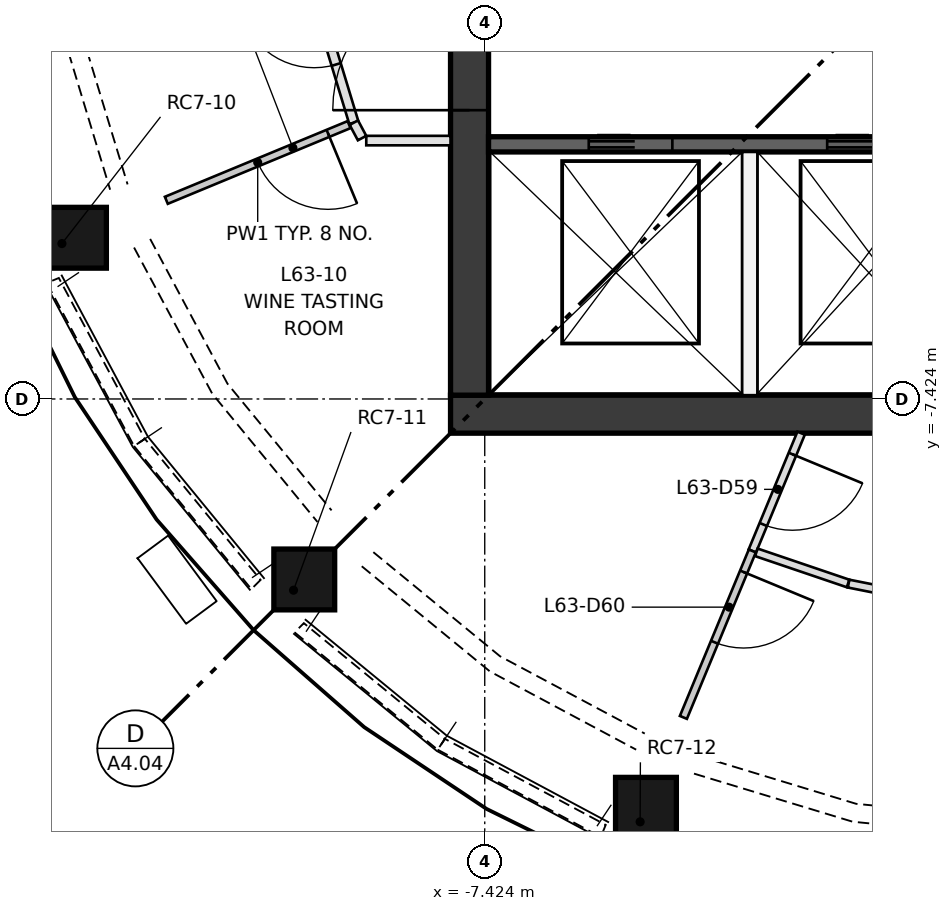
"""IFC4 building model, lengths in metres.
Left out: names, types, materials, properties, quantities, classifications, styles, units other than length and angle.
Written with IfcOpenShell. Run it as: python <this file> out.ifc"""

import sys

from ifc_helpers import new_model, si_unit, direction, frame, frame_2d, origin, origin_2d, place, context, subcontext, project, spatial, polyline, rectangle, outline, extrude, element, fill, save


model = new_model("IFC4")
c1 = context("Model", 3, precision=1e-05, world=origin(), true_north=direction((0.0, 1.0)))
c2 = subcontext(c1, "Body", "Model", "MODEL_VIEW")
j1 = project(units=[si_unit("LENGTHUNIT", "METRE"), si_unit("PLANEANGLEUNIT", "RADIAN")], contexts=[c1])
p1 = place(None, origin())
s1 = spatial("IfcSite", under=j1, at=p1, CompositionType="ELEMENT")
p2 = place(p1, origin())
s2 = spatial("IfcBuilding", under=s1, at=p2, CompositionType="ELEMENT")
p3 = place(p2, frame((0.0, 0.0, 231.2)))
s3 = spatial("IfcBuildingStorey", under=s2, at=p3, CompositionType="ELEMENT", Elevation=231.2)
p4 = place(p3, frame((-12.987, -5.379, 0.5), z_axis=(0.0, 0.0, 1.0), x_axis=(-0.382642651649, 0.923896423382, 0.0)))
e1 = element("IfcColumn", 1, at=p4, inside=s3, PredefinedType="COLUMN", context=c2, shape_type="SweptSolid", body=[
    extrude(rectangle(XDim=0.8, YDim=0.8, at=origin_2d()), origin(), (0.0, -0.275, 0.962), 3.328),
])
p5 = place(p3, frame((-9.94, -9.94, 0.5), z_axis=(0.0, 0.0, 1.0), x_axis=(-0.707106781187, 0.707106781187, 0.0)))
e2 = element("IfcColumn", 2, at=p5, inside=s3, PredefinedType="COLUMN", context=c2, shape_type="SweptSolid", body=[
    extrude(rectangle(XDim=0.8, YDim=0.8, at=origin_2d()), origin(), (0.0, -0.275, 0.962), 3.328),
])
p6 = place(p3, frame((-5.379, -12.987, 0.5), z_axis=(0.0, 0.0, 1.0), x_axis=(-0.923896423382, 0.382642651649, 0.0)))
e3 = element("IfcColumn", 3, at=p6, inside=s3, PredefinedType="COLUMN", context=c2, shape_type="SweptSolid", body=[
    extrude(rectangle(XDim=0.8, YDim=0.8, at=origin_2d()), origin(), (0.0, -0.275, 0.962), 3.328),
])
p7 = place(p3, frame((-7.874, -7.624, 0.0), z_axis=(0.0, 0.0, 1.0), x_axis=(1.0, 0.0, 0.0)))
e4 = element("IfcWall", 4, at=p7, inside=s3, PredefinedType="SHEAR", context=c2, shape_type="SweptSolid", body=[
    extrude(rectangle(XDim=15.748, YDim=0.5, at=frame_2d((7.874, 0.0))), origin(), (0.0, 0.0, 1.0), 3.3),
])
p8 = place(p3, frame((-7.624, -7.374, 0.0), z_axis=(0.0, 0.0, 1.0), x_axis=(0.0, 1.0, 0.0)))
e5 = element("IfcWall", 5, at=p8, inside=s3, PredefinedType="SHEAR", context=c2, shape_type="SweptSolid", body=[
    extrude(rectangle(XDim=14.748, YDim=0.5, at=frame_2d((7.374, 0.0))), origin(), (0.0, 0.0, 1.0), 3.3),
])
p9 = place(p8, frame((6.874, 0.0, 0.0)))
e6 = element("IfcOpeningElement", 6, at=p9, cuts=e5, PredefinedType="OPENING", context=c2, shape_type="SweptSolid", body=[
    extrude(rectangle(XDim=1.0, YDim=2.1, at=frame_2d((0.5, 1.05))), frame((0.0, 0.26, 0.0), z_axis=(0.0, -1.0, 0.0), x_axis=(1.0, 0.0, 0.0)), (0.0, 0.0, 1.0), 0.52),
])
p10 = place(p8, frame((3.75, 0.0, 0.0)))
e7 = element("IfcOpeningElement", 7, at=p10, cuts=e5, PredefinedType="OPENING", context=c2, shape_type="SweptSolid", body=[
    extrude(rectangle(XDim=1.8, YDim=2.1, at=frame_2d((0.9, 1.05))), frame((0.0, 0.26, 0.0), z_axis=(0.0, -1.0, 0.0), x_axis=(1.0, 0.0, 0.0)), (0.0, 0.0, 1.0), 0.52),
])
p11 = place(p8, frame((9.198, 0.0, 0.0)))
e8 = element("IfcOpeningElement", 8, at=p11, cuts=e5, PredefinedType="OPENING", context=c2, shape_type="SweptSolid", body=[
    extrude(rectangle(XDim=1.8, YDim=2.1, at=frame_2d((0.9, 1.05))), frame((0.0, 0.26, 0.0), z_axis=(0.0, -1.0, 0.0), x_axis=(1.0, 0.0, 0.0)), (0.0, 0.0, 1.0), 0.52),
])
p12 = place(p3, frame((-7.374, -4.074, 0.0), z_axis=(0.0, 0.0, 1.0), x_axis=(1.0, 0.0, 0.0)))
e9 = element("IfcWall", 9, at=p12, inside=s3, PredefinedType="SHEAR", context=c2, shape_type="SweptSolid", body=[
    extrude(rectangle(XDim=14.748, YDim=0.2, at=frame_2d((7.374, 0.0))), origin(), (0.0, 0.0, 1.0), 3.3),
])
p13 = place(p12, frame((1.319, 0.0, 0.0)))
e10 = element("IfcOpeningElement", 10, at=p13, cuts=e9, PredefinedType="OPENING", context=c2, shape_type="SweptSolid", body=[
    extrude(rectangle(XDim=1.1, YDim=2.1, at=frame_2d((0.55, 1.05))), frame((0.0, 0.11, 0.0), z_axis=(0.0, -1.0, 0.0), x_axis=(1.0, 0.0, 0.0)), (0.0, 0.0, 1.0), 0.22),
])
p14 = place(p12, frame((4.456, 0.0, 0.0)))
e11 = element("IfcOpeningElement", 11, at=p14, cuts=e9, PredefinedType="OPENING", context=c2, shape_type="SweptSolid", body=[
    extrude(rectangle(XDim=1.1, YDim=2.1, at=frame_2d((0.55, 1.05))), frame((0.0, 0.11, 0.0), z_axis=(0.0, -1.0, 0.0), x_axis=(1.0, 0.0, 0.0)), (0.0, 0.0, 1.0), 0.22),
])
p15 = place(p12, frame((7.689, 0.0, 0.0)))
e12 = element("IfcOpeningElement", 12, at=p15, cuts=e9, PredefinedType="OPENING", context=c2, shape_type="SweptSolid", body=[
    extrude(rectangle(XDim=1.0, YDim=2.1, at=frame_2d((0.5, 1.05))), frame((0.0, 0.11, 0.0), z_axis=(0.0, -1.0, 0.0), x_axis=(1.0, 0.0, 0.0)), (0.0, 0.0, 1.0), 0.22),
])
p16 = place(p12, frame((10.413, 0.0, 0.0)))
e13 = element("IfcOpeningElement", 13, at=p16, cuts=e9, PredefinedType="OPENING", context=c2, shape_type="SweptSolid", body=[
    extrude(rectangle(XDim=1.0, YDim=2.1, at=frame_2d((0.5, 1.05))), frame((0.0, 0.11, 0.0), z_axis=(0.0, -1.0, 0.0), x_axis=(1.0, 0.0, 0.0)), (0.0, 0.0, 1.0), 0.22),
])
p17 = place(p12, frame((12.935, 0.0, 0.0)))
e14 = element("IfcOpeningElement", 14, at=p17, cuts=e9, PredefinedType="OPENING", context=c2, shape_type="SweptSolid", body=[
    extrude(rectangle(XDim=1.0, YDim=2.1, at=frame_2d((0.5, 1.05))), frame((0.0, 0.11, 0.0), z_axis=(0.0, -1.0, 0.0), x_axis=(1.0, 0.0, 0.0)), (0.0, 0.0, 1.0), 0.22),
])
p18 = place(p3, frame((-3.937, -7.374, 0.0), z_axis=(0.0, 0.0, 1.0), x_axis=(0.0, 1.0, 0.0)))
e15 = element("IfcWall", 15, at=p18, inside=s3, PredefinedType="PARTITIONING", context=c2, shape_type="SweptSolid", body=[
    extrude(rectangle(XDim=3.2, YDim=0.2, at=frame_2d((1.6, 0.0))), origin(), (0.0, 0.0, 1.0), 3.3),
])
p19 = place(p3, frame((-14.2, -2.824, 0.0), z_axis=(-0.894721380135, -0.271074750296, 0.354953703573), x_axis=(0.289959608839, -0.957038883806, 1.1226683e-05)))
e16 = element("IfcWall", 16, at=p19, inside=s3, PredefinedType="SOLIDWALL", context=c2, shape_type="SweptSolid", body=[
    extrude(outline(polyline([(0.0, 0.0), (2.434, -5.551e-17), (2.417, 0.481), (0.017, 0.481), (0.0, 0.0)])), origin(), (0.0, 0.0, -1.0), 0.3),
])
p20 = place(p3, frame((-13.186, -5.898, 0.0), z_axis=(-0.824332600798, -0.441016524886, 0.35493687895), x_axis=(0.471734377661, -0.881740708382, 1.0715603e-05)))
e17 = element("IfcWall", 17, at=p20, inside=s3, PredefinedType="SOLIDWALL", context=c2, shape_type="SweptSolid", body=[
    extrude(outline(polyline([(0.0, 0.0), (2.434, 0.0), (2.417, 0.481), (0.017, 0.481), (0.0, 0.0)])), origin(), (0.0, 0.0, -1.0), 0.3),
])
p21 = place(p3, frame((-12.038, -8.044, 0.0), z_axis=(-0.722862546463, -0.59284076781, 0.354978257002), x_axis=(0.634136527431, -0.773221096766, -9.701072e-06)))
e18 = element("IfcWall", 18, at=p21, inside=s3, PredefinedType="SOLIDWALL", context=c2, shape_type="SweptSolid", body=[
    extrude(outline(polyline([(0.0, 0.0), (2.434, 5.551e-17), (2.417, 0.481), (0.017, 0.481), (0.0, 0.0)])), origin(), (0.0, 0.0, -1.0), 0.3),
])
p22 = place(p3, frame((-9.926, -10.495, 0.0), z_axis=(-0.59284076781, -0.722862546463, 0.354978257002), x_axis=(0.773221096766, -0.634136527431, 9.701072e-06)))
e19 = element("IfcWall", 19, at=p22, inside=s3, PredefinedType="SOLIDWALL", context=c2, shape_type="SweptSolid", body=[
    extrude(outline(polyline([(0.0, 0.0), (2.434, -5.551e-17), (2.417, 0.481), (0.017, 0.481), (0.0, 0.0)])), origin(), (0.0, 0.0, -1.0), 0.3),
])
p23 = place(p3, frame((-8.044, -12.038, 0.0), z_axis=(-0.441126603603, -0.824402860411, 0.354636776631), x_axis=(0.881712517728, -0.471787066311, 1.195964e-05)))
e20 = element("IfcWall", 20, at=p23, inside=s3, PredefinedType="SOLIDWALL", context=c2, shape_type="SweptSolid", body=[
    extrude(outline(polyline([(0.0, 0.0), (2.434, 5.551e-17), (2.417, 0.481), (0.017, 0.481), (0.0, 0.0)])), origin(), (0.0, 0.0, -1.0), 0.3),
])
p24 = place(p3, frame((-5.154, -13.494, 0.0), z_axis=(-0.271094631402, -0.894631168658, 0.355165838574), x_axis=(0.957026634075, -0.290000037325, 4.815507e-06)))
e21 = element("IfcWall", 21, at=p24, inside=s3, PredefinedType="SOLIDWALL", context=c2, shape_type="SweptSolid", body=[
    extrude(outline(polyline([(0.0, 0.0), (2.434, 0.0), (2.417, 0.481), (0.017, 0.481), (0.0, 0.0)])), origin(), (0.0, 0.0, -1.0), 0.3),
])
p25 = place(p3, frame((-9.146, -3.789, 0.0), z_axis=(0.0, 0.0, 1.0), x_axis=(-0.29025256199, 0.956950077203, 0.0)))
e22 = element("IfcWall", 22, at=p25, inside=s3, PredefinedType="PARTITIONING", context=c2, shape_type="SweptSolid", body=[
    extrude(rectangle(XDim=1.935, YDim=0.125, at=frame_2d((0.967, 0.0))), origin(), (0.0, 0.0, 1.0), 3.3),
])
p26 = place(p25, frame((0.8, 0.0, 0.0)))
e23 = element("IfcOpeningElement", 23, at=p26, cuts=e22, PredefinedType="OPENING", context=c2, shape_type="SweptSolid", body=[
    extrude(rectangle(XDim=1.0, YDim=2.1, at=frame_2d((0.5, 1.05))), frame((0.0, 0.073, 0.0), z_axis=(0.0, -1.0, 0.0), x_axis=(1.0, 0.0, 0.0)), (0.0, 0.0, 1.0), 0.145),
])
p27 = place(p3, frame((-9.038, -3.991, 0.0), z_axis=(0.0, 0.0, 1.0), x_axis=(-0.471249165364, 0.882000127066, 0.0)))
e24 = element("IfcWall", 24, at=p27, inside=s3, PredefinedType="PARTITIONING", context=c2, shape_type="SweptSolid", body=[
    extrude(rectangle(XDim=0.23, YDim=0.125, at=frame_2d((0.115, 0.0))), origin(), (0.0, 0.0, 1.0), 3.3),
])
p28 = place(p3, frame((-7.874, -4.024, 0.0), z_axis=(0.0, 0.0, 1.0), x_axis=(-1.0, 0.0, 0.0)))
e25 = element("IfcWall", 25, at=p28, inside=s3, PredefinedType="PARTITIONING", context=c2, shape_type="SweptSolid", body=[
    extrude(rectangle(XDim=1.109, YDim=0.125, at=frame_2d((0.554, 0.0))), origin(), (0.0, 0.0, 1.0), 3.3),
])
p29 = place(p3, frame((-9.209, -3.814, 0.0), z_axis=(0.0, 0.0, 1.0), x_axis=(-0.923885342263, -0.382669406082, 0.0)))
e26 = element("IfcWall", 26, at=p29, inside=s3, PredefinedType="PARTITIONING", context=c2, shape_type="SweptSolid", body=[
    extrude(rectangle(XDim=2.602, YDim=0.1, at=frame_2d((1.301, 0.0))), origin(), (0.0, 0.0, 1.0), 3.3),
])
p30 = place(p29, frame((0.3, 0.0, 0.0)))
e27 = element("IfcOpeningElement", 27, at=p30, cuts=e26, PredefinedType="OPENING", context=c2, shape_type="SweptSolid", body=[
    extrude(rectangle(XDim=1.0, YDim=2.1, at=frame_2d((0.5, 1.05))), frame((0.0, 0.06, 0.0), z_axis=(0.0, -1.0, 0.0), x_axis=(1.0, 0.0, 0.0)), (0.0, 0.0, 1.0), 0.12),
])
p31 = place(p3, frame((-3.261, -7.874, 0.0), z_axis=(0.0, 0.0, 1.0), x_axis=(-0.382681757498, -0.923880226262, 0.0)))
e28 = element("IfcWall", 28, at=p31, inside=s3, PredefinedType="PARTITIONING", context=c2, shape_type="SweptSolid", body=[
    extrude(rectangle(XDim=1.677, YDim=0.105, at=frame_2d((0.839, 0.0))), origin(), (0.0, 0.0, 1.0), 3.3),
])
p32 = place(p31, frame((0.3, 0.0, 0.0)))
e29 = element("IfcOpeningElement", 29, at=p32, cuts=e28, PredefinedType="OPENING", context=c2, shape_type="SweptSolid", body=[
    extrude(rectangle(XDim=1.0, YDim=2.1, at=frame_2d((0.5, 1.05))), frame((0.0, 0.062, 0.0), z_axis=(0.0, -1.0, 0.0), x_axis=(1.0, 0.0, 0.0)), (0.0, 0.0, 1.0), 0.125),
])
p33 = place(p3, frame((-3.903, -9.424, 0.0), z_axis=(0.0, 0.0, 1.0), x_axis=(-0.382676271808, -0.923882498479, 0.0)))
e30 = element("IfcWall", 30, at=p33, inside=s3, PredefinedType="PARTITIONING", context=c2, shape_type="SweptSolid", body=[
    extrude(rectangle(XDim=2.37, YDim=0.1, at=frame_2d((1.185, 0.0))), origin(), (0.0, 0.0, 1.0), 3.3),
])
p34 = place(p33, frame((0.3, 0.0, 0.0)))
e31 = element("IfcOpeningElement", 31, at=p34, cuts=e30, PredefinedType="OPENING", context=c2, shape_type="SweptSolid", body=[
    extrude(rectangle(XDim=1.0, YDim=2.1, at=frame_2d((0.5, 1.05))), frame((0.0, 0.06, 0.0), z_axis=(0.0, -1.0, 0.0), x_axis=(1.0, 0.0, 0.0)), (0.0, 0.0, 1.0), 0.12),
])
p35 = place(p3, frame((-2.643, -9.851, 0.0), z_axis=(0.0, 0.0, 1.0), x_axis=(-0.946945394448, 0.321394492695, 0.0)))
e32 = element("IfcWall", 32, at=p35, inside=s3, PredefinedType="PARTITIONING", context=c2, shape_type="SweptSolid", body=[
    extrude(rectangle(XDim=1.275, YDim=0.105, at=frame_2d((0.637, 0.0))), origin(), (0.0, 0.0, 1.0), 3.3),
])
p36 = place(p3, frame((-1.335, -10.112, 0.0), z_axis=(0.0, 0.0, 1.0), x_axis=(-0.980778229799, 0.195125764451, 0.0)))
e33 = element("IfcWall", 33, at=p36, inside=s3, PredefinedType="PARTITIONING", context=c2, shape_type="SweptSolid", body=[
    extrude(rectangle(XDim=1.328, YDim=0.105, at=frame_2d((0.664, 0.0))), origin(), (0.0, 0.0, 1.0), 3.3),
])
p37 = place(p13, origin())
e34 = element("IfcDoor", 34, at=p37, inside=s3, OperationType="DOUBLE_DOOR_SLIDING", PredefinedType="DOOR", context=c2, shape_type="SweptSolid", body=[
    extrude(rectangle(XDim=1.1, YDim=2.1, at=frame_2d((0.55, 1.05))), frame((0.0, 0.025, 0.0), z_axis=(0.0, -1.0, 0.0), x_axis=(1.0, 0.0, 0.0)), (0.0, 0.0, 1.0), 0.05),
])
fill(e10, e34)
p38 = place(p14, origin())
e35 = element("IfcDoor", 35, at=p38, inside=s3, OperationType="DOUBLE_DOOR_SLIDING", PredefinedType="DOOR", context=c2, shape_type="SweptSolid", body=[
    extrude(rectangle(XDim=1.1, YDim=2.1, at=frame_2d((0.55, 1.05))), frame((0.0, 0.025, 0.0), z_axis=(0.0, -1.0, 0.0), x_axis=(1.0, 0.0, 0.0)), (0.0, 0.0, 1.0), 0.05),
])
fill(e11, e35)
p39 = place(p10, origin())
e36 = element("IfcDoor", 36, at=p39, inside=s3, OperationType="DOUBLE_DOOR_SINGLE_SWING", PredefinedType="DOOR", context=c2, shape_type="SweptSolid", body=[
    extrude(rectangle(XDim=1.8, YDim=2.1, at=frame_2d((0.9, 1.05))), frame((0.0, 0.025, 0.0), z_axis=(0.0, -1.0, 0.0), x_axis=(1.0, 0.0, 0.0)), (0.0, 0.0, 1.0), 0.05),
])
fill(e7, e36)
p40 = place(p26, origin())
e37 = element("IfcDoor", 37, at=p40, inside=s3, OperationType="SINGLE_SWING_RIGHT", PredefinedType="DOOR", context=c2, shape_type="SweptSolid", body=[
    extrude(rectangle(XDim=1.0, YDim=2.1, at=frame_2d((0.5, 1.05))), frame((0.0, 0.025, 0.0), z_axis=(0.0, -1.0, 0.0), x_axis=(1.0, 0.0, 0.0)), (0.0, 0.0, 1.0), 0.05),
])
fill(e23, e37)
p41 = place(p30, origin())
e38 = element("IfcDoor", 38, at=p41, inside=s3, OperationType="SINGLE_SWING_LEFT", PredefinedType="DOOR", context=c2, shape_type="SweptSolid", body=[
    extrude(rectangle(XDim=1.0, YDim=2.1, at=frame_2d((0.5, 1.05))), frame((0.0, 0.025, 0.0), z_axis=(0.0, -1.0, 0.0), x_axis=(1.0, 0.0, 0.0)), (0.0, 0.0, 1.0), 0.05),
])
fill(e27, e38)
p42 = place(p32, origin())
e39 = element("IfcDoor", 39, at=p42, inside=s3, OperationType="SINGLE_SWING_LEFT", PredefinedType="DOOR", context=c2, shape_type="SweptSolid", body=[
    extrude(rectangle(XDim=1.0, YDim=2.1, at=frame_2d((0.5, 1.05))), frame((0.0, 0.025, 0.0), z_axis=(0.0, -1.0, 0.0), x_axis=(1.0, 0.0, 0.0)), (0.0, 0.0, 1.0), 0.05),
])
fill(e29, e39)
p43 = place(p34, origin())
e40 = element("IfcDoor", 40, at=p43, inside=s3, OperationType="SINGLE_SWING_LEFT", PredefinedType="DOOR", context=c2, shape_type="SweptSolid", body=[
    extrude(rectangle(XDim=1.0, YDim=2.1, at=frame_2d((0.5, 1.05))), frame((0.0, 0.025, 0.0), z_axis=(0.0, -1.0, 0.0), x_axis=(1.0, 0.0, 0.0)), (0.0, 0.0, 1.0), 0.05),
])
fill(e31, e40)
save(model, sys.argv[1])
